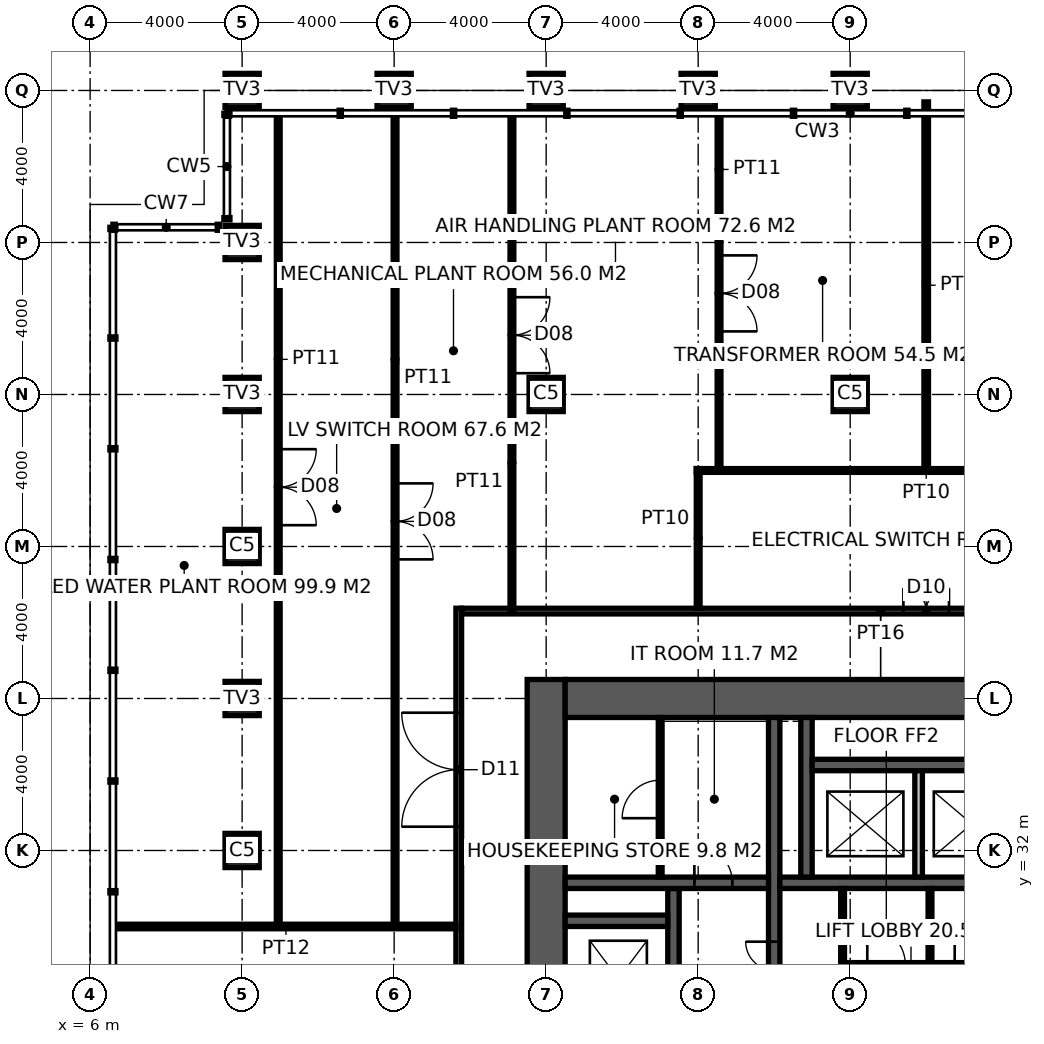
"""IFC4 building model, lengths in metres.
Left out: names, types, materials, properties, quantities, classifications, styles, units other than length and angle.
Written with IfcOpenShell. Run it as: python <this file> out.ifc"""

import sys

from ifc_helpers import new_model, si_unit, direction, frame, frame_2d, origin, origin_2d, place, context, subcontext, project, spatial, rectangle, hollow_rectangle, extrude, element, fill, save


model = new_model("IFC4")
c1 = context("Model", 3, precision=1e-05, world=origin(), true_north=direction((0.0, 1.0)))
c2 = subcontext(c1, "Body", "Model", "MODEL_VIEW")
j1 = project(units=[si_unit("LENGTHUNIT", "METRE"), si_unit("PLANEANGLEUNIT", "RADIAN")], contexts=[c1])
p1 = place(None, origin())
s1 = spatial("IfcSite", under=j1, at=p1, CompositionType="ELEMENT")
p2 = place(p1, origin())
s2 = spatial("IfcBuilding", under=s1, at=p2, CompositionType="ELEMENT")
p3 = place(p2, frame((0.0, 0.0, 137.4)))
s3 = spatial("IfcBuildingStorey", under=s2, at=p3, CompositionType="ELEMENT", Elevation=137.4)
for number, where, z_axis, x_axis in (
    (1, (10.0, 52.0, 0.0), (0.0, 0.0, 1.0), (1.0, 0.0, 0.0)),
    (2, (14.0, 52.0, 0.0), (0.0, 0.0, 1.0), (1.0, 0.0, 0.0)),
    (3, (18.0, 52.0, 0.0), (0.0, 0.0, 1.0), (1.0, 0.0, 0.0)),
    (4, (22.0, 52.0, 0.0), (0.0, 0.0, 1.0), (1.0, 0.0, 0.0)),
    (5, (26.0, 52.0, 0.0), (0.0, 0.0, 1.0), (1.0, 0.0, 0.0)),
    (6, (10.0, 36.0, 0.0), (0.0, 0.0, 1.0), (1.0, 0.0, 0.0)),
    (7, (10.0, 44.0, 0.0), (0.0, 0.0, 1.0), (1.0, 0.0, 0.0)),
    (8, (10.0, 48.0, 0.0), (0.0, 0.0, 1.0), (1.0, 0.0, 0.0)),
):
    element("IfcColumn", number, at=place(p3, frame(where, z_axis=z_axis, x_axis=x_axis)), inside=s3, PredefinedType="USERDEFINED", context=c2, shape_type="SweptSolid", body=[
        extrude(hollow_rectangle(XDim=0.9, YDim=0.9, WallThickness=0.08, at=origin_2d()), origin(), (0.0, 0.0, 1.0), 5.4),
    ])
for number, where, z_axis, x_axis in (
    (9, (10.0, 32.0, 0.0), (0.0, 0.0, 1.0), (1.0, 0.0, 0.0)),
    (10, (10.0, 40.0, 0.0), (0.0, 0.0, 1.0), (1.0, 0.0, 0.0)),
    (11, (18.0, 44.0, 0.0), (0.0, 0.0, 1.0), (1.0, 0.0, 0.0)),
    (12, (26.0, 44.0, 0.0), (0.0, 0.0, 1.0), (1.0, 0.0, 0.0)),
):
    element("IfcColumn", number, at=place(p3, frame(where, z_axis=z_axis, x_axis=x_axis)), inside=s3, PredefinedType="COLUMN", context=c2, shape_type="SweptSolid", body=[
        extrude(hollow_rectangle(XDim=0.9, YDim=0.9, WallThickness=0.1, at=origin_2d()), origin(), (0.0, 0.0, 1.0), 5.4),
    ])
p4 = place(p3, frame((18.0, 17.5, -0.15), z_axis=(0.0, 0.0, 1.0), x_axis=(0.0, 1.0, 0.0)))
e13 = element("IfcWall", 13, at=p4, inside=s3, PredefinedType="SHEAR", context=c2, shape_type="SweptSolid", body=[
    extrude(rectangle(XDim=19.0, YDim=1.0, at=frame_2d((9.5, 0.0))), origin(), (0.0, 0.0, 1.0), 5.4),
])
p5 = place(p3, frame((18.5, 36.0, -0.15), z_axis=(0.0, 0.0, 1.0), x_axis=(1.0, 0.0, 0.0)))
e14 = element("IfcWall", 14, at=p5, inside=s3, PredefinedType="SHEAR", context=c2, shape_type="SweptSolid", body=[
    extrude(rectangle(XDim=17.6, YDim=1.0, at=frame_2d((8.8, 0.0))), origin(), (0.0, 0.0, 1.0), 5.4),
])
p6 = place(p3, frame((24.0, 18.5, -0.15), z_axis=(0.0, 0.0, 1.0), x_axis=(0.0, 1.0, 0.0)))
e15 = element("IfcWall", 15, at=p6, inside=s3, PredefinedType="SHEAR", context=c2, shape_type="SweptSolid", body=[
    extrude(rectangle(XDim=17.0, YDim=0.3, at=frame_2d((8.5, 0.0))), origin(), (0.0, 0.0, 1.0), 5.4),
])
p7 = place(p6, frame((9.6, 0.0, 0.15)))
e16 = element("IfcOpeningElement", 16, at=p7, cuts=e15, PredefinedType="OPENING", context=c2, shape_type="SweptSolid", body=[
    extrude(rectangle(XDim=1.5, YDim=2.4, at=frame_2d((0.75, 1.2))), frame((0.0, 0.16, 0.0), z_axis=(0.0, -1.0, 0.0), x_axis=(1.0, 0.0, 0.0)), (0.0, 0.0, 1.0), 0.32),
])
p8 = place(p3, frame((24.15, 31.15, -0.15), z_axis=(0.0, 0.0, 1.0), x_axis=(1.0, 0.0, 0.0)))
e17 = element("IfcWall", 17, at=p8, inside=s3, PredefinedType="SHEAR", context=c2, shape_type="SweptSolid", body=[
    extrude(rectangle(XDim=11.25, YDim=0.3, at=frame_2d((5.625, 0.0))), origin(), (0.0, 0.0, 1.0), 5.4),
])
p9 = place(p8, frame((7.25, 0.0, 0.15)))
e18 = element("IfcOpeningElement", 18, at=p9, cuts=e17, PredefinedType="OPENING", context=c2, shape_type="SweptSolid", body=[
    extrude(rectangle(XDim=1.4, YDim=2.4, at=frame_2d((0.7, 1.2))), frame((0.0, 0.16, 0.0), z_axis=(0.0, -1.0, 0.0), x_axis=(1.0, 0.0, 0.0)), (0.0, 0.0, 1.0), 0.32),
])
p10 = place(p3, frame((21.35, 18.5, -0.15), z_axis=(0.0, 0.0, 1.0), x_axis=(0.0, 1.0, 0.0)))
e19 = element("IfcWall", 19, at=p10, inside=s3, PredefinedType="SHEAR", context=c2, shape_type="SweptSolid", body=[
    extrude(rectangle(XDim=12.5, YDim=0.3, at=frame_2d((6.25, 0.0))), origin(), (0.0, 0.0, 1.0), 5.4),
])
p11 = place(p3, frame((18.5, 31.15, -0.15), z_axis=(0.0, 0.0, 1.0), x_axis=(1.0, 0.0, 0.0)))
e20 = element("IfcWall", 20, at=p11, inside=s3, PredefinedType="SHEAR", context=c2, shape_type="SweptSolid", body=[
    extrude(rectangle(XDim=5.35, YDim=0.3, at=frame_2d((2.675, 0.0))), origin(), (0.0, 0.0, 1.0), 5.4),
])
p12 = place(p11, frame((3.4, 0.0, 0.15)))
e21 = element("IfcOpeningElement", 21, at=p12, cuts=e20, PredefinedType="OPENING", context=c2, shape_type="SweptSolid", body=[
    extrude(rectangle(XDim=1.0, YDim=2.2, at=frame_2d((0.5, 1.1))), frame((0.0, 0.16, 0.0), z_axis=(0.0, -1.0, 0.0), x_axis=(1.0, 0.0, 0.0)), (0.0, 0.0, 1.0), 0.32),
])
p13 = place(p3, frame((18.5, 30.15, -0.15), z_axis=(0.0, 0.0, 1.0), x_axis=(1.0, 0.0, 0.0)))
e22 = element("IfcWall", 22, at=p13, inside=s3, PredefinedType="SHEAR", context=c2, shape_type="SweptSolid", body=[
    extrude(rectangle(XDim=2.7, YDim=0.3, at=frame_2d((1.35, 0.0))), origin(), (0.0, 0.0, 1.0), 5.4),
])
p14 = place(p3, frame((24.85, 31.3, -0.15), z_axis=(0.0, 0.0, 1.0), x_axis=(0.0, 1.0, 0.0)))
e23 = element("IfcWall", 23, at=p14, inside=s3, PredefinedType="SHEAR", context=c2, shape_type="SweptSolid", body=[
    extrude(rectangle(XDim=4.2, YDim=0.3, at=frame_2d((2.1, 0.0))), origin(), (0.0, 0.0, 1.0), 5.4),
])
p15 = place(p3, frame((25.0, 34.25, -0.15), z_axis=(0.0, 0.0, 1.0), x_axis=(1.0, 0.0, 0.0)))
e24 = element("IfcWall", 24, at=p15, inside=s3, PredefinedType="SHEAR", context=c2, shape_type="SweptSolid", body=[
    extrude(rectangle(XDim=8.6, YDim=0.3, at=frame_2d((4.3, 0.0))), origin(), (0.0, 0.0, 1.0), 5.4),
])
p16 = place(p3, frame((27.8, 31.3, -0.15), z_axis=(0.0, 0.0, 1.0), x_axis=(0.0, 1.0, 0.0)))
e25 = element("IfcWall", 25, at=p16, inside=s3, PredefinedType="SOLIDWALL", context=c2, shape_type="SweptSolid", body=[
    extrude(rectangle(XDim=2.8, YDim=0.2, at=frame_2d((1.4, 0.0))), origin(), (0.0, 0.0, 1.0), 5.4),
])
p17 = place(p3, frame((21.0, 31.3, 0.0), z_axis=(0.0, 0.0, 1.0), x_axis=(0.0, 1.0, 0.0)))
e26 = element("IfcWall", 26, at=p17, inside=s3, PredefinedType="PARTITIONING", context=c2, shape_type="SweptSolid", body=[
    extrude(rectangle(XDim=4.2, YDim=0.1, at=frame_2d((2.1, 0.0))), origin(), (0.0, 0.0, 1.0), 5.25),
])
p18 = place(p17, frame((1.55, 0.0, 0.0)))
e27 = element("IfcOpeningElement", 27, at=p18, cuts=e26, PredefinedType="OPENING", context=c2, shape_type="SweptSolid", body=[
    extrude(rectangle(XDim=1.0, YDim=2.2, at=frame_2d((0.5, 1.1))), frame((0.0, 0.06, 0.0), z_axis=(0.0, -1.0, 0.0), x_axis=(1.0, 0.0, 0.0)), (0.0, 0.0, 1.0), 0.12),
])
p19 = place(p3, frame((25.75, 29.0, 0.0), z_axis=(0.0, 0.0, 1.0), x_axis=(1.0, 0.0, 0.0)))
e28 = element("IfcWall", 28, at=p19, inside=s3, PredefinedType="PARTITIONING", context=c2, shape_type="SweptSolid", body=[
    extrude(rectangle(XDim=4.7, YDim=0.1, at=frame_2d((2.35, 0.0))), origin(), (0.0, 0.0, 1.0), 5.25),
])
p20 = place(p19, frame((0.7, 0.0, 0.0)))
e29 = element("IfcOpeningElement", 29, at=p20, cuts=e28, PredefinedType="OPENING", context=c2, shape_type="SweptSolid", body=[
    extrude(rectangle(XDim=1.0, YDim=2.2, at=frame_2d((0.5, 1.1))), frame((0.0, 0.06, 0.0), z_axis=(0.0, -1.0, 0.0), x_axis=(1.0, 0.0, 0.0)), (0.0, 0.0, 1.0), 0.12),
])
p21 = place(p19, frame((3.0, 0.0, 0.0)))
e30 = element("IfcOpeningElement", 30, at=p21, cuts=e28, PredefinedType="OPENING", context=c2, shape_type="SweptSolid", body=[
    extrude(rectangle(XDim=1.0, YDim=2.2, at=frame_2d((0.5, 1.1))), frame((0.0, 0.06, 0.0), z_axis=(0.0, -1.0, 0.0), x_axis=(1.0, 0.0, 0.0)), (0.0, 0.0, 1.0), 0.12),
])
for number, where, z_axis, x_axis in (
    (31, (25.8, 29.05, 0.0), (0.0, 0.0, 1.0), (0.0, 1.0, 0.0)),
    (32, (28.1, 29.05, 0.0), (0.0, 0.0, 1.0), (0.0, 1.0, 0.0)),
):
    element("IfcWall", number, at=place(p3, frame(where, z_axis=z_axis, x_axis=x_axis)), inside=s3, PredefinedType="PARTITIONING", context=c2, shape_type="SweptSolid", body=[
        extrude(rectangle(XDim=1.95, YDim=0.1, at=frame_2d((0.975, 0.0))), origin(), (0.0, 0.0, 1.0), 5.25),
    ])
p22 = place(p3, frame((15.7, 15.025, 0.0), z_axis=(0.0, 0.0, 1.0), x_axis=(0.0, 1.0, 0.0)))
e33 = element("IfcWall", 33, at=p22, inside=s3, PredefinedType="PARTITIONING", context=c2, shape_type="SweptSolid", body=[
    extrude(rectangle(XDim=23.35, YDim=0.15, at=frame_2d((11.675, 0.0))), origin(), (0.0, 0.0, 1.0), 5.25),
])
p23 = place(p22, frame((6.449, 0.0, 0.0)))
e34 = element("IfcOpeningElement", 34, at=p23, cuts=e33, PredefinedType="OPENING", context=c2, shape_type="SweptSolid", body=[
    extrude(rectangle(XDim=2.0, YDim=2.4, at=frame_2d((1.0, 1.2))), frame((0.0, 0.085, 0.0), z_axis=(0.0, -1.0, 0.0), x_axis=(1.0, 0.0, 0.0)), (0.0, 0.0, 1.0), 0.17),
])
p24 = place(p22, frame((17.601, 0.0, 0.0)))
e35 = element("IfcOpeningElement", 35, at=p24, cuts=e33, PredefinedType="OPENING", context=c2, shape_type="SweptSolid", body=[
    extrude(rectangle(XDim=3.0, YDim=3.3, at=frame_2d((1.5, 1.65))), frame((0.0, 0.085, 0.0), z_axis=(0.0, -1.0, 0.0), x_axis=(1.0, 0.0, 0.0)), (0.0, 0.0, 1.0), 0.17),
])
p25 = place(p3, frame((15.775, 38.3, 0.0), z_axis=(0.0, 0.0, 1.0), x_axis=(1.0, 0.0, 0.0)))
e36 = element("IfcWall", 36, at=p25, inside=s3, PredefinedType="PARTITIONING", context=c2, shape_type="SweptSolid", body=[
    extrude(rectangle(XDim=22.05, YDim=0.15, at=frame_2d((11.025, 0.0))), origin(), (0.0, 0.0, 1.0), 5.25),
])
p26 = place(p25, frame((11.625, 0.0, 0.0)))
e37 = element("IfcOpeningElement", 37, at=p26, cuts=e36, PredefinedType="OPENING", context=c2, shape_type="SweptSolid", body=[
    extrude(rectangle(XDim=1.2, YDim=2.2, at=frame_2d((0.6, 1.1))), frame((0.0, 0.085, 0.0), z_axis=(0.0, -1.0, 0.0), x_axis=(1.0, 0.0, 0.0)), (0.0, 0.0, 1.0), 0.17),
])
p27 = place(p3, frame((22.0, 38.375, 0.0), z_axis=(0.0, 0.0, 1.0), x_axis=(0.0, 1.0, 0.0)))
e38 = element("IfcWall", 38, at=p27, inside=s3, PredefinedType="PARTITIONING", context=c2, shape_type="SweptSolid", body=[
    extrude(rectangle(XDim=3.675, YDim=0.1, at=frame_2d((1.837, 0.0))), origin(), (0.0, 0.0, 1.0), 4.35),
])
p28 = place(p3, frame((21.95, 42.0, 0.0), z_axis=(0.0, 0.0, 1.0), x_axis=(1.0, 0.0, 0.0)))
e39 = element("IfcWall", 39, at=p28, inside=s3, PredefinedType="PARTITIONING", context=c2, shape_type="SweptSolid", body=[
    extrude(rectangle(XDim=12.1, YDim=0.1, at=frame_2d((6.05, 0.0))), origin(), (0.0, 0.0, 1.0), 5.25),
])
p29 = place(p3, frame((28.0, 42.05, 0.0), z_axis=(0.0, 0.0, 1.0), x_axis=(0.0, 1.0, 0.0)))
e40 = element("IfcWall", 40, at=p29, inside=s3, PredefinedType="PARTITIONING", context=c2, shape_type="SweptSolid", body=[
    extrude(rectangle(XDim=9.65, YDim=0.12, at=frame_2d((4.825, 0.0))), origin(), (0.0, 0.0, 1.0), 5.25),
])
p30 = place(p3, frame((6.68, 30.0, 0.0), z_axis=(0.0, 0.0, 1.0), x_axis=(1.0, 0.0, 0.0)))
e41 = element("IfcWall", 41, at=p30, inside=s3, PredefinedType="PARTITIONING", context=c2, shape_type="SweptSolid", body=[
    extrude(rectangle(XDim=8.945, YDim=0.12, at=frame_2d((4.473, 0.0))), origin(), (0.0, 0.0, 1.0), 5.25),
])
p31 = place(p3, frame((17.099, 51.32, 0.0), z_axis=(0.0, 0.0, 1.0), x_axis=(0.0, -1.0, 0.0)))
e42 = element("IfcWall", 42, at=p31, inside=s3, PredefinedType="PARTITIONING", context=c2, shape_type="SweptSolid", body=[
    extrude(rectangle(XDim=13.02, YDim=0.1, at=frame_2d((6.51, 0.0))), origin(), (0.0, 0.0, 1.0), 5.25),
])
p32 = place(p31, frame((4.76, 0.0, 0.0)))
e43 = element("IfcOpeningElement", 43, at=p32, cuts=e42, PredefinedType="OPENING", context=c2, shape_type="SweptSolid", body=[
    extrude(rectangle(XDim=2.0, YDim=2.4, at=frame_2d((1.0, 1.2))), frame((0.0, 0.06, 0.0), z_axis=(0.0, -1.0, 0.0), x_axis=(1.0, 0.0, 0.0)), (0.0, 0.0, 1.0), 0.12),
])
p33 = place(p3, frame((10.95, 51.32, 0.0), z_axis=(0.0, 0.0, 1.0), x_axis=(0.0, -1.0, 0.0)))
e44 = element("IfcWall", 44, at=p33, inside=s3, PredefinedType="PARTITIONING", context=c2, shape_type="SweptSolid", body=[
    extrude(rectangle(XDim=21.319, YDim=0.1, at=frame_2d((10.66, 0.0))), origin(), (0.0, 0.0, 1.0), 5.25),
])
p34 = place(p33, frame((8.76, 0.0, 0.0)))
e45 = element("IfcOpeningElement", 45, at=p34, cuts=e44, PredefinedType="OPENING", context=c2, shape_type="SweptSolid", body=[
    extrude(rectangle(XDim=2.0, YDim=2.4, at=frame_2d((1.0, 1.2))), frame((0.0, 0.06, 0.0), z_axis=(0.0, -1.0, 0.0), x_axis=(1.0, 0.0, 0.0)), (0.0, 0.0, 1.0), 0.12),
])
p35 = place(p3, frame((22.549, 51.32, 0.0), z_axis=(0.0, 0.0, 1.0), x_axis=(0.0, -1.0, 0.0)))
e46 = element("IfcWall", 46, at=p35, inside=s3, PredefinedType="PARTITIONING", context=c2, shape_type="SweptSolid", body=[
    extrude(rectangle(XDim=9.32, YDim=0.1, at=frame_2d((4.66, 0.0))), origin(), (0.0, 0.0, 1.0), 5.25),
])
p36 = place(p35, frame((3.66, 0.0, 0.0)))
e47 = element("IfcOpeningElement", 47, at=p36, cuts=e46, PredefinedType="OPENING", context=c2, shape_type="SweptSolid", body=[
    extrude(rectangle(XDim=2.0, YDim=2.4, at=frame_2d((1.0, 1.2))), frame((0.0, 0.06, 0.0), z_axis=(0.0, -1.0, 0.0), x_axis=(1.0, 0.0, 0.0)), (0.0, 0.0, 1.0), 0.12),
])
p37 = place(p3, frame((14.024, 51.32, 0.0), z_axis=(0.0, 0.0, 1.0), x_axis=(0.0, -1.0, 0.0)))
e48 = element("IfcWall", 48, at=p37, inside=s3, PredefinedType="PARTITIONING", context=c2, shape_type="SweptSolid", body=[
    extrude(rectangle(XDim=21.319, YDim=0.1, at=frame_2d((10.66, 0.0))), origin(), (0.0, 0.0, 1.0), 4.35),
])
p38 = place(p37, frame((9.659, 0.0, 0.0)))
e49 = element("IfcOpeningElement", 49, at=p38, cuts=e48, PredefinedType="OPENING", context=c2, shape_type="SweptSolid", body=[
    extrude(rectangle(XDim=2.0, YDim=2.4, at=frame_2d((1.0, 1.2))), frame((0.0, 0.06, 0.0), z_axis=(0.0, -1.0, 0.0), x_axis=(1.0, 0.0, 0.0)), (0.0, 0.0, 1.0), 0.12),
])
p39 = place(p7, origin())
e50 = element("IfcDoor", 50, at=p39, inside=s3, OperationType="DOUBLE_DOOR_DOUBLE_SWING", PredefinedType="DOOR", context=c2, shape_type="SweptSolid", body=[
    extrude(rectangle(XDim=1.5, YDim=2.4, at=frame_2d((0.75, 1.2))), frame((0.0, 0.025, 0.0), z_axis=(0.0, -1.0, 0.0), x_axis=(1.0, 0.0, 0.0)), (0.0, 0.0, 1.0), 0.05),
])
fill(e16, e50)
p40 = place(p12, origin())
e51 = element("IfcDoor", 51, at=p40, inside=s3, OperationType="SINGLE_SWING_LEFT", PredefinedType="DOOR", context=c2, shape_type="SweptSolid", body=[
    extrude(rectangle(XDim=1.0, YDim=2.2, at=frame_2d((0.5, 1.1))), frame((0.0, 0.025, 0.0), z_axis=(0.0, -1.0, 0.0), x_axis=(1.0, 0.0, 0.0)), (0.0, 0.0, 1.0), 0.05),
])
fill(e21, e51)
p41 = place(p18, origin())
e52 = element("IfcDoor", 52, at=p41, inside=s3, OperationType="SINGLE_SWING_LEFT", PredefinedType="DOOR", context=c2, shape_type="SweptSolid", body=[
    extrude(rectangle(XDim=1.0, YDim=2.2, at=frame_2d((0.5, 1.1))), frame((0.0, 0.025, 0.0), z_axis=(0.0, -1.0, 0.0), x_axis=(1.0, 0.0, 0.0)), (0.0, 0.0, 1.0), 0.05),
])
fill(e27, e52)
p42 = place(p20, origin())
e53 = element("IfcDoor", 53, at=p42, inside=s3, OperationType="SINGLE_SWING_LEFT", PredefinedType="DOOR", context=c2, shape_type="SweptSolid", body=[
    extrude(rectangle(XDim=1.0, YDim=2.2, at=frame_2d((0.5, 1.1))), frame((0.0, 0.025, 0.0), z_axis=(0.0, -1.0, 0.0), x_axis=(1.0, 0.0, 0.0)), (0.0, 0.0, 1.0), 0.05),
])
fill(e29, e53)
p43 = place(p21, origin())
e54 = element("IfcDoor", 54, at=p43, inside=s3, OperationType="SINGLE_SWING_LEFT", PredefinedType="DOOR", context=c2, shape_type="SweptSolid", body=[
    extrude(rectangle(XDim=1.0, YDim=2.2, at=frame_2d((0.5, 1.1))), frame((0.0, 0.025, 0.0), z_axis=(0.0, -1.0, 0.0), x_axis=(1.0, 0.0, 0.0)), (0.0, 0.0, 1.0), 0.05),
])
fill(e30, e54)
p44 = place(p26, origin())
e55 = element("IfcDoor", 55, at=p44, inside=s3, OperationType="DOUBLE_DOOR_DOUBLE_SWING", PredefinedType="DOOR", context=c2, shape_type="SweptSolid", body=[
    extrude(rectangle(XDim=1.2, YDim=2.2, at=frame_2d((0.6, 1.1))), frame((0.0, 0.025, 0.0), z_axis=(0.0, -1.0, 0.0), x_axis=(1.0, 0.0, 0.0)), (0.0, 0.0, 1.0), 0.05),
])
fill(e37, e55)
p45 = place(p24, origin())
e56 = element("IfcDoor", 56, at=p45, inside=s3, OperationType="DOUBLE_DOOR_DOUBLE_SWING", PredefinedType="DOOR", context=c2, shape_type="SweptSolid", body=[
    extrude(rectangle(XDim=3.0, YDim=3.3, at=frame_2d((1.5, 1.65))), frame((0.0, 0.025, 0.0), z_axis=(0.0, -1.0, 0.0), x_axis=(1.0, 0.0, 0.0)), (0.0, 0.0, 1.0), 0.05),
])
fill(e35, e56)
p46 = place(p32, origin())
e57 = element("IfcDoor", 57, at=p46, inside=s3, OperationType="DOUBLE_DOOR_DOUBLE_SWING", PredefinedType="DOOR", context=c2, shape_type="SweptSolid", body=[
    extrude(rectangle(XDim=2.0, YDim=2.4, at=frame_2d((1.0, 1.2))), frame((0.0, 0.025, 0.0), z_axis=(0.0, -1.0, 0.0), x_axis=(1.0, 0.0, 0.0)), (0.0, 0.0, 1.0), 0.05),
])
fill(e43, e57)
p47 = place(p34, origin())
e58 = element("IfcDoor", 58, at=p47, inside=s3, OperationType="DOUBLE_DOOR_DOUBLE_SWING", PredefinedType="DOOR", context=c2, shape_type="SweptSolid", body=[
    extrude(rectangle(XDim=2.0, YDim=2.4, at=frame_2d((1.0, 1.2))), frame((0.0, 0.025, 0.0), z_axis=(0.0, -1.0, 0.0), x_axis=(1.0, 0.0, 0.0)), (0.0, 0.0, 1.0), 0.05),
])
fill(e45, e58)
p48 = place(p36, origin())
e59 = element("IfcDoor", 59, at=p48, inside=s3, OperationType="DOUBLE_DOOR_DOUBLE_SWING", PredefinedType="DOOR", context=c2, shape_type="SweptSolid", body=[
    extrude(rectangle(XDim=2.0, YDim=2.4, at=frame_2d((1.0, 1.2))), frame((0.0, 0.025, 0.0), z_axis=(0.0, -1.0, 0.0), x_axis=(1.0, 0.0, 0.0)), (0.0, 0.0, 1.0), 0.05),
])
fill(e47, e59)
p49 = place(p38, origin())
e60 = element("IfcDoor", 60, at=p49, inside=s3, OperationType="DOUBLE_DOOR_DOUBLE_SWING", PredefinedType="DOOR", context=c2, shape_type="SweptSolid", body=[
    extrude(rectangle(XDim=2.0, YDim=2.4, at=frame_2d((1.0, 1.2))), frame((0.0, 0.025, 0.0), z_axis=(0.0, -1.0, 0.0), x_axis=(1.0, 0.0, 0.0)), (0.0, 0.0, 1.0), 0.05),
])
fill(e49, e60)
save(model, sys.argv[1])
